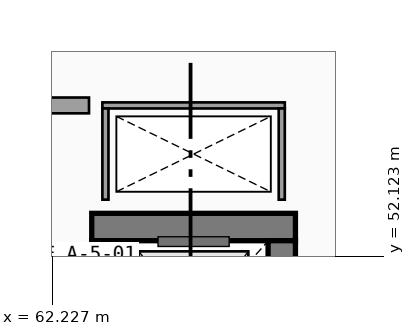
"""IFC4 building model, lengths in metres.
Left out: names, types, materials, properties, quantities, classifications, styles, units other than length and angle.
Written with IfcOpenShell. Run it as: python <this file> out.ifc"""

import sys

from ifc_helpers import new_model, si_unit, direction, frame, frame_2d, origin, place, context, subcontext, project, spatial, rectangle, extrude, element, save


model = new_model("IFC4")
c1 = context("Model", 3, precision=1e-05, world=origin(), true_north=direction((0.0, 1.0)))
c2 = subcontext(c1, "Body", "Model", "MODEL_VIEW")
j1 = project(units=[si_unit("LENGTHUNIT", "METRE"), si_unit("PLANEANGLEUNIT", "RADIAN")], contexts=[c1])
p1 = place(None, origin())
s1 = spatial("IfcSite", under=j1, at=p1, CompositionType="ELEMENT")
p2 = place(p1, origin())
s2 = spatial("IfcBuilding", under=s1, at=p2, CompositionType="ELEMENT")
p3 = place(p2, frame((0.0, 0.0, 18.6)))
s3 = spatial("IfcBuildingStorey", under=s2, at=p3, CompositionType="ELEMENT", Elevation=18.6)
p4 = place(p3, frame((66.225, 52.6, 0.0), z_axis=(0.0, 0.0, 1.0), x_axis=(-1.0, 0.0, 0.0)))
e1 = element("IfcWall", 1, at=p4, inside=s3, PredefinedType="SHEAR", context=c2, shape_type="SweptSolid", body=[
    extrude(rectangle(XDim=3.35, YDim=0.45, at=frame_2d((1.675, 0.0))), origin(), (0.0, 0.0, 1.0), 4.24),
])
p5 = place(p3, frame((63.1, 52.375, 0.0), z_axis=(0.0, 0.0, 1.0), x_axis=(0.0, -1.0, 0.0)))
e2 = element("IfcWall", 2, at=p5, inside=s3, PredefinedType="SHEAR", context=c2, shape_type="SweptSolid", body=[
    extrude(rectangle(XDim=2.75, YDim=0.45, at=frame_2d((1.375, 0.0))), origin(), (0.0, 0.0, 1.0), 4.24),
])
p6 = place(p5, frame((0.725, 0.0, 0.0), z_axis=(0.0, 0.0, 1.0), x_axis=(1.0, 0.0, 0.0)))
e3 = element("IfcOpeningElement", 3, at=p6, cuts=e2, PredefinedType="OPENING", context=c2, shape_type="SweptSolid", body=[
    extrude(rectangle(XDim=1.3, YDim=2.25, at=frame_2d((0.65, 1.125))), frame((0.0, 0.235, 0.0), z_axis=(0.0, -1.0, 0.0), x_axis=(1.0, 0.0, 0.0)), (0.0, 0.0, 1.0), 0.47),
])
p7 = place(p3, frame((66.0, 49.625, 0.0), z_axis=(0.0, 0.0, 1.0), x_axis=(0.0, 1.0, 0.0)))
e4 = element("IfcWall", 4, at=p7, inside=s3, PredefinedType="SHEAR", context=c2, shape_type="SweptSolid", body=[
    extrude(rectangle(XDim=2.75, YDim=0.45, at=frame_2d((1.375, 0.0))), origin(), (0.0, 0.0, 1.0), 4.24),
])
p8 = place(p3, frame((66.05, 54.6, 0.0), z_axis=(0.0, 0.0, 1.0), x_axis=(-1.0, 0.0, 0.0)))
e5 = element("IfcWall", 5, at=p8, inside=s3, PredefinedType="PARTITIONING", context=c2, shape_type="SweptSolid", body=[
    extrude(rectangle(XDim=3.0, YDim=0.1, at=frame_2d((1.5, 0.0))), origin(), (0.0, 0.0, 1.0), 4.24),
])
for number, where, z_axis, x_axis in (
    (6, (63.1, 54.55, 0.0), (0.0, 0.0, 1.0), (0.0, -1.0, 0.0)),
    (7, (66.0, 53.05, 0.0), (0.0, 0.0, 1.0), (0.0, 1.0, 0.0)),
):
    element("IfcWall", number, at=place(p3, frame(where, z_axis=z_axis, x_axis=x_axis)), inside=s3, PredefinedType="PARTITIONING", context=c2, shape_type="SweptSolid", body=[
        extrude(rectangle(XDim=1.5, YDim=0.1, at=frame_2d((0.75, 0.0))), origin(), (0.0, 0.0, 1.0), 4.24),
    ])
p9 = place(p3, frame((62.83, 54.6, 0.0), z_axis=(0.0, 0.0, 1.0), x_axis=(-1.0, 0.0, 0.0)))
e8 = element("IfcWall", 8, at=p9, inside=s3, PredefinedType="SOLIDWALL", context=c2, shape_type="SweptSolid", body=[
    extrude(rectangle(XDim=3.76, YDim=0.26, at=frame_2d((1.88, 0.0))), origin(), (0.0, 0.0, 1.0), 4.24),
])
save(model, sys.argv[1])
